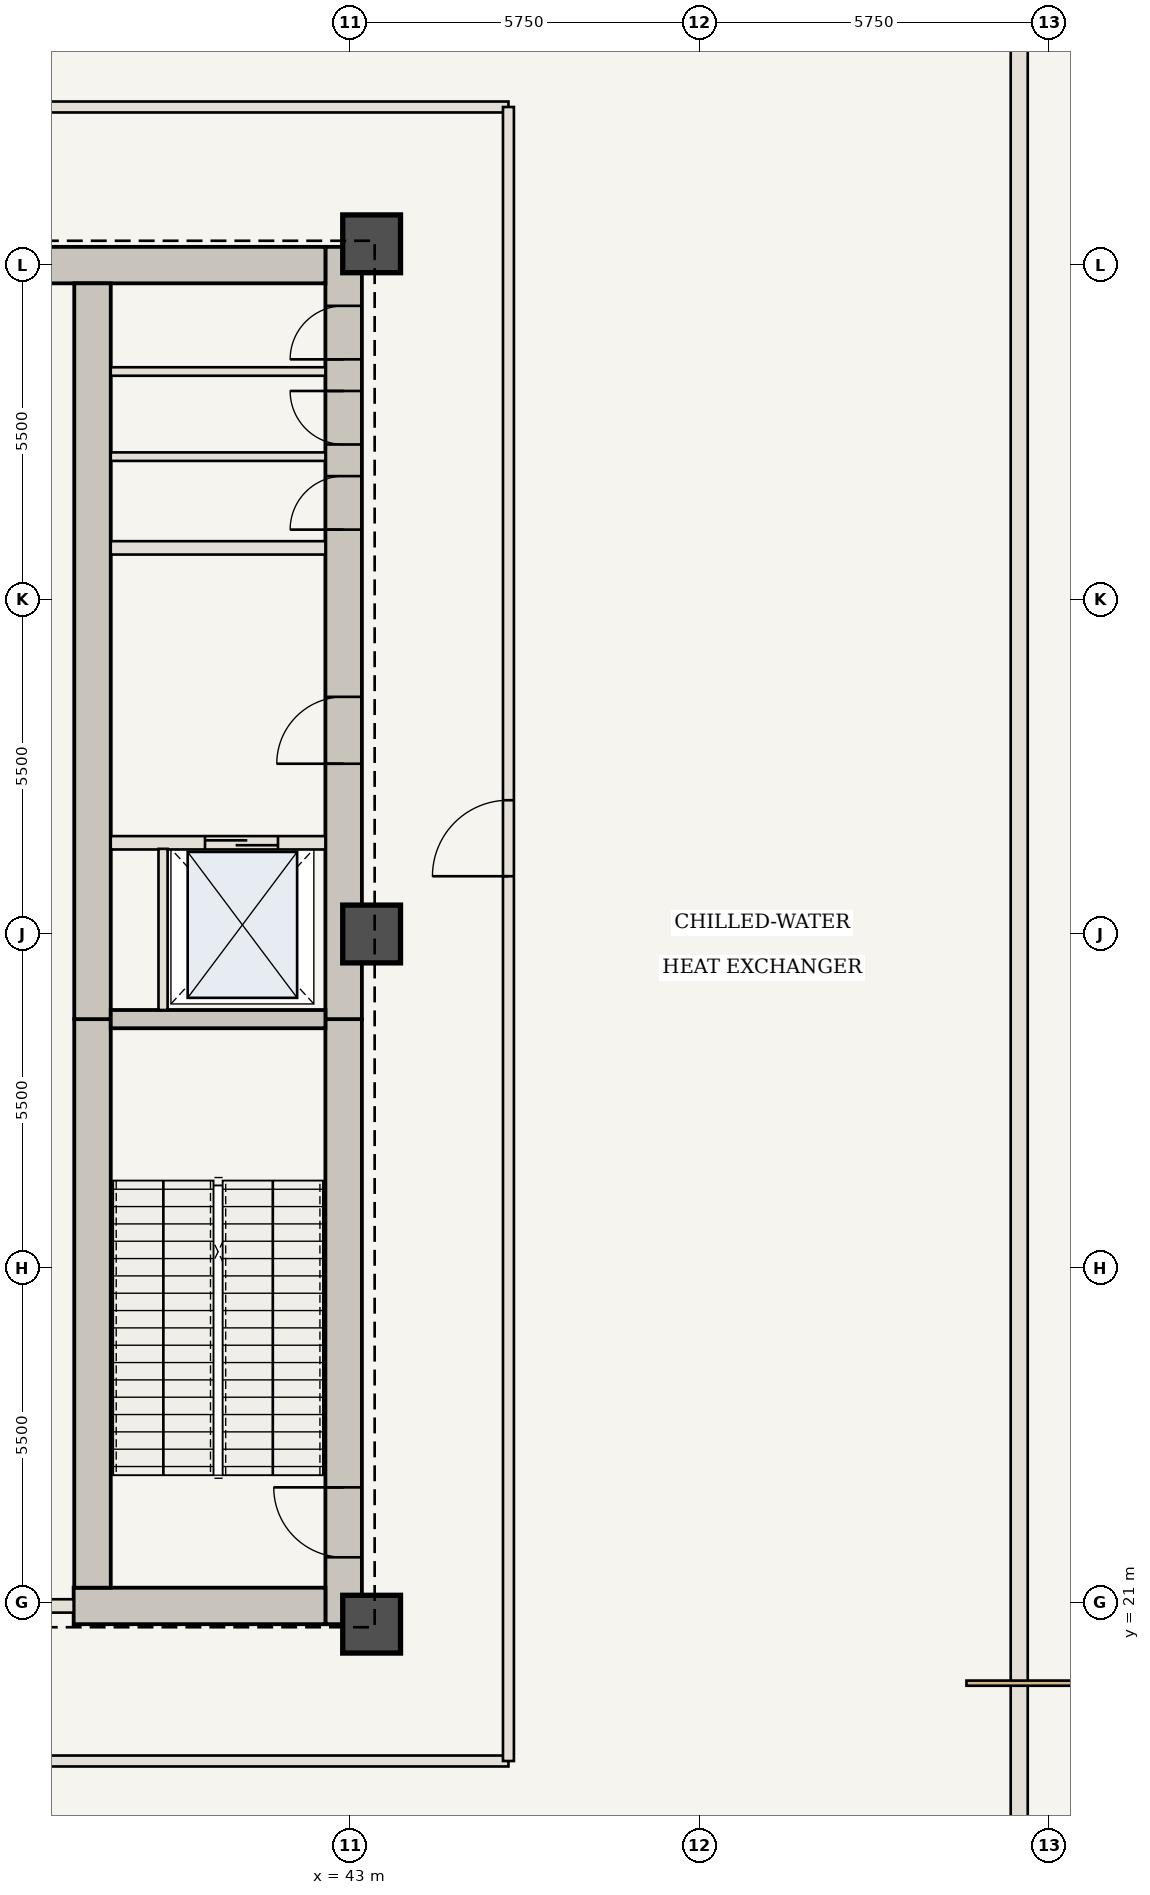
"""IFC4 building model, lengths in metres.
Left out: names, types, materials, properties, quantities, classifications, styles, units other than length and angle.
Written with IfcOpenShell. Run it as: python <this file> out.ifc"""

import sys

from ifc_helpers import new_model, si_unit, direction, frame, frame_2d, origin, origin_2d, place, context, subcontext, project, spatial, rectangle, extrude, element, fill, save


model = new_model("IFC4")
c1 = context("Model", 3, precision=1e-05, world=origin(), true_north=direction((0.0, 1.0)))
c2 = subcontext(c1, "Body", "Model", "MODEL_VIEW")
j1 = project(units=[si_unit("LENGTHUNIT", "METRE"), si_unit("PLANEANGLEUNIT", "RADIAN")], contexts=[c1])
p1 = place(None, origin())
s1 = spatial("IfcSite", under=j1, at=p1, CompositionType="ELEMENT")
p2 = place(p1, origin())
s2 = spatial("IfcBuilding", under=s1, at=p2, CompositionType="ELEMENT")
p3 = place(p2, frame((0.0, 0.0, 176.05)))
s3 = spatial("IfcBuildingStorey", under=s2, at=p3, CompositionType="ELEMENT", Elevation=176.05)
p4 = place(p3, frame((42.89, 20.65, 0.0), z_axis=(0.0, 0.0, 1.0), x_axis=(0.0, 1.0, 0.0)))
e1 = element("IfcWall", 1, at=p4, inside=s3, PredefinedType="SHEAR", context=c2, shape_type="SweptSolid", body=[
    extrude(rectangle(XDim=9.95, YDim=0.6, at=frame_2d((4.975, 0.0))), origin(), (0.0, 0.0, 1.0), 6.3),
])
p5 = place(p4, frame((1.1, 0.0, 0.0)))
e2 = element("IfcOpeningElement", 2, at=p5, cuts=e1, PredefinedType="OPENING", context=c2, shape_type="SweptSolid", body=[
    extrude(rectangle(XDim=1.15, YDim=2.15, at=frame_2d((0.575, 1.075))), frame((0.0, 0.31, 0.0), z_axis=(0.0, -1.0, 0.0), x_axis=(1.0, 0.0, 0.0)), (0.0, 0.0, 1.0), 0.62),
])
p6 = place(p3, frame((42.89, 30.6, 0.0), z_axis=(0.0, 0.0, 1.0), x_axis=(0.0, 1.0, 0.0)))
e3 = element("IfcWall", 3, at=p6, inside=s3, PredefinedType="SHEAR", context=c2, shape_type="SweptSolid", body=[
    extrude(rectangle(XDim=12.7, YDim=0.6, at=frame_2d((6.35, 0.0))), origin(), (0.0, 0.0, 1.0), 6.3),
])
p7 = place(p6, frame((4.2, 0.0, 0.0)))
e4 = element("IfcOpeningElement", 4, at=p7, cuts=e3, PredefinedType="OPENING", context=c2, shape_type="SweptSolid", body=[
    extrude(rectangle(XDim=1.1, YDim=2.15, at=frame_2d((0.55, 1.075))), frame((0.0, 0.31, 0.0), z_axis=(0.0, -1.0, 0.0), x_axis=(1.0, 0.0, 0.0)), (0.0, 0.0, 1.0), 0.62),
])
p8 = place(p6, frame((8.05, 0.0, 0.0)))
e5 = element("IfcOpeningElement", 5, at=p8, cuts=e3, PredefinedType="OPENING", context=c2, shape_type="SweptSolid", body=[
    extrude(rectangle(XDim=0.88, YDim=2.1, at=frame_2d((0.44, 1.05))), frame((0.0, 0.31, 0.0), z_axis=(0.0, -1.0, 0.0), x_axis=(1.0, 0.0, 0.0)), (0.0, 0.0, 1.0), 0.62),
])
p9 = place(p6, frame((9.45, 0.0, 0.0)))
e6 = element("IfcOpeningElement", 6, at=p9, cuts=e3, PredefinedType="OPENING", context=c2, shape_type="SweptSolid", body=[
    extrude(rectangle(XDim=0.88, YDim=2.1, at=frame_2d((0.44, 1.05))), frame((0.0, 0.31, 0.0), z_axis=(0.0, -1.0, 0.0), x_axis=(1.0, 0.0, 0.0)), (0.0, 0.0, 1.0), 0.62),
])
p10 = place(p6, frame((10.85, 0.0, 0.0)))
e7 = element("IfcOpeningElement", 7, at=p10, cuts=e3, PredefinedType="OPENING", context=c2, shape_type="SweptSolid", body=[
    extrude(rectangle(XDim=0.88, YDim=2.1, at=frame_2d((0.44, 1.05))), frame((0.0, 0.31, 0.0), z_axis=(0.0, -1.0, 0.0), x_axis=(1.0, 0.0, 0.0)), (0.0, 0.0, 1.0), 0.62),
])
p11 = place(p3, frame((38.45, 20.95, 0.0), z_axis=(0.0, 0.0, 1.0), x_axis=(1.0, 0.0, 0.0)))
e8 = element("IfcWall", 8, at=p11, inside=s3, PredefinedType="SHEAR", context=c2, shape_type="SweptSolid", body=[
    extrude(rectangle(XDim=4.14, YDim=0.6, at=frame_2d((2.07, 0.0))), origin(), (0.0, 0.0, 1.0), 6.3),
])
p12 = place(p3, frame((37.75, 43.0, 0.0), z_axis=(0.0, 0.0, 1.0), x_axis=(1.0, 0.0, 0.0)))
e9 = element("IfcWall", 9, at=p12, inside=s3, PredefinedType="SHEAR", context=c2, shape_type="SweptSolid", body=[
    extrude(rectangle(XDim=4.84, YDim=0.6, at=frame_2d((2.42, 0.0))), origin(), (0.0, 0.0, 1.0), 6.3),
])
p13 = place(p3, frame((38.76, 21.25, 0.0), z_axis=(0.0, 0.0, 1.0), x_axis=(0.0, 1.0, 0.0)))
e10 = element("IfcWall", 10, at=p13, inside=s3, PredefinedType="SHEAR", context=c2, shape_type="SweptSolid", body=[
    extrude(rectangle(XDim=9.35, YDim=0.6, at=frame_2d((4.675, 0.0))), origin(), (0.0, 0.0, 1.0), 6.3),
])
p14 = place(p3, frame((38.76, 30.6, 0.0), z_axis=(0.0, 0.0, 1.0), x_axis=(0.0, 1.0, 0.0)))
e11 = element("IfcWall", 11, at=p14, inside=s3, PredefinedType="SHEAR", context=c2, shape_type="SweptSolid", body=[
    extrude(rectangle(XDim=12.1, YDim=0.6, at=frame_2d((6.05, 0.0))), origin(), (0.0, 0.0, 1.0), 6.3),
])
for number, where, z_axis, x_axis in (
    (12, (43.35, 20.65, 0.0), (0.0, 0.0, 1.0), (1.0, 0.0, 0.0)),
    (13, (43.35, 32.0, 0.0), (0.0, 0.0, 1.0), (1.0, 0.0, 0.0)),
    (14, (43.35, 43.35, 0.0), (0.0, 0.0, 1.0), (1.0, 0.0, 0.0)),
):
    element("IfcColumn", number, at=place(p3, frame(where, z_axis=z_axis, x_axis=x_axis)), inside=s3, PredefinedType="COLUMN", context=c2, shape_type="SweptSolid", body=[
        extrude(rectangle(XDim=0.95, YDim=0.95, at=origin_2d()), origin(), (0.0, 0.0, 1.0), 5.88),
    ])
p15 = place(p3, frame((39.06, 30.6, 0.0), z_axis=(0.0, 0.0, 1.0), x_axis=(1.0, 0.0, 0.0)))
e15 = element("IfcWall", 15, at=p15, inside=s3, PredefinedType="SHEAR", context=c2, shape_type="SweptSolid", body=[
    extrude(rectangle(XDim=3.53, YDim=0.3, at=frame_2d((1.765, 0.0))), origin(), (0.0, 0.0, 1.0), 5.88),
])
p16 = place(p3, frame((39.06, 33.5, 0.0), z_axis=(0.0, 0.0, 1.0), x_axis=(1.0, 0.0, 0.0)))
e16 = element("IfcWall", 16, at=p16, inside=s3, PredefinedType="STANDARD", context=c2, shape_type="SweptSolid", body=[
    extrude(rectangle(XDim=3.53, YDim=0.22, at=frame_2d((1.765, 0.0))), origin(), (0.0, 0.0, 1.0), 5.88),
])
p17 = place(p16, frame((1.55, 0.0, 0.0)))
e17 = element("IfcOpeningElement", 17, at=p17, cuts=e16, PredefinedType="OPENING", context=c2, shape_type="SweptSolid", body=[
    extrude(rectangle(XDim=1.2, YDim=2.2, at=frame_2d((0.6, 1.1))), frame((0.0, 0.12, 0.0), z_axis=(0.0, -1.0, 0.0), x_axis=(1.0, 0.0, 0.0)), (0.0, 0.0, 1.0), 0.24),
])
p18 = place(p3, frame((39.92, 30.75, 0.0), z_axis=(0.0, 0.0, 1.0), x_axis=(0.0, 1.0, 0.0)))
e18 = element("IfcWall", 18, at=p18, inside=s3, PredefinedType="STANDARD", context=c2, shape_type="SweptSolid", body=[
    extrude(rectangle(XDim=2.65, YDim=0.15, at=frame_2d((1.325, 0.0))), origin(), (0.0, 0.0, 1.0), 5.88),
])
p19 = place(p3, frame((39.06, 38.35, 0.0), z_axis=(0.0, 0.0, 1.0), x_axis=(1.0, 0.0, 0.0)))
e19 = element("IfcWall", 19, at=p19, inside=s3, PredefinedType="STANDARD", context=c2, shape_type="SweptSolid", body=[
    extrude(rectangle(XDim=3.53, YDim=0.22, at=frame_2d((1.765, 0.0))), origin(), (0.0, 0.0, 1.0), 5.88),
])
for number, where, z_axis, x_axis in (
    (20, (39.06, 39.85, 0.0), (0.0, 0.0, 1.0), (1.0, 0.0, 0.0)),
    (21, (39.06, 41.25, 0.0), (0.0, 0.0, 1.0), (1.0, 0.0, 0.0)),
):
    element("IfcWall", number, at=place(p3, frame(where, z_axis=z_axis, x_axis=x_axis)), inside=s3, PredefinedType="STANDARD", context=c2, shape_type="SweptSolid", body=[
        extrude(rectangle(XDim=3.53, YDim=0.14, at=frame_2d((1.765, 0.0))), origin(), (0.0, 0.0, 1.0), 5.88),
    ])
p20 = place(p3, frame((35.15, 20.95, 0.0), z_axis=(0.0, 0.0, 1.0), x_axis=(1.0, 0.0, 0.0)))
e22 = element("IfcWall", 22, at=p20, inside=s3, PredefinedType="STANDARD", context=c2, shape_type="SweptSolid", body=[
    extrude(rectangle(XDim=3.3, YDim=0.22, at=frame_2d((1.65, 0.0))), origin(), (0.0, 0.0, 1.0), 5.88),
])
p21 = place(p20, frame((1.1, 0.0, 0.0)))
e23 = element("IfcOpeningElement", 23, at=p21, cuts=e22, PredefinedType="OPENING", context=c2, shape_type="SweptSolid", body=[
    extrude(rectangle(XDim=1.1, YDim=2.15, at=frame_2d((0.55, 1.075))), frame((0.0, 0.12, 0.0), z_axis=(0.0, -1.0, 0.0), x_axis=(1.0, 0.0, 0.0)), (0.0, 0.0, 1.0), 0.24),
])
p22 = place(p3, frame((18.4, 18.4, 0.0), z_axis=(0.0, 0.0, 1.0), x_axis=(1.0, 0.0, 0.0)))
e24 = element("IfcWall", 24, at=p22, inside=s3, PredefinedType="STANDARD", context=c2, shape_type="SweptSolid", body=[
    extrude(rectangle(XDim=27.2, YDim=0.18, at=frame_2d((13.6, 0.0))), origin(), (0.0, 0.0, 1.0), 5.88),
])
p23 = place(p22, frame((4.4, 0.0, 0.0)))
e25 = element("IfcOpeningElement", 25, at=p23, cuts=e24, PredefinedType="OPENING", context=c2, shape_type="SweptSolid", body=[
    extrude(rectangle(XDim=1.25, YDim=2.2, at=frame_2d((0.625, 1.1))), frame((0.0, 0.1, 0.0), z_axis=(0.0, -1.0, 0.0), x_axis=(1.0, 0.0, 0.0)), (0.0, 0.0, 1.0), 0.2),
])
p24 = place(p3, frame((18.4, 45.6, 0.0), z_axis=(0.0, 0.0, 1.0), x_axis=(1.0, 0.0, 0.0)))
e26 = element("IfcWall", 26, at=p24, inside=s3, PredefinedType="STANDARD", context=c2, shape_type="SweptSolid", body=[
    extrude(rectangle(XDim=27.2, YDim=0.18, at=frame_2d((13.6, 0.0))), origin(), (0.0, 0.0, 1.0), 5.88),
])
p25 = place(p24, frame((4.4, 0.0, 0.0)))
e27 = element("IfcOpeningElement", 27, at=p25, cuts=e26, PredefinedType="OPENING", context=c2, shape_type="SweptSolid", body=[
    extrude(rectangle(XDim=1.25, YDim=2.2, at=frame_2d((0.625, 1.1))), frame((0.0, 0.1, 0.0), z_axis=(0.0, -1.0, 0.0), x_axis=(1.0, 0.0, 0.0)), (0.0, 0.0, 1.0), 0.2),
])
p26 = place(p3, frame((45.6, 18.4, 0.0), z_axis=(0.0, 0.0, 1.0), x_axis=(0.0, 1.0, 0.0)))
e28 = element("IfcWall", 28, at=p26, inside=s3, PredefinedType="STANDARD", context=c2, shape_type="SweptSolid", body=[
    extrude(rectangle(XDim=27.2, YDim=0.18, at=frame_2d((13.6, 0.0))), origin(), (0.0, 0.0, 1.0), 5.88),
])
p27 = place(p26, frame((14.55, 0.0, 0.0)))
e29 = element("IfcOpeningElement", 29, at=p27, cuts=e28, PredefinedType="OPENING", context=c2, shape_type="SweptSolid", body=[
    extrude(rectangle(XDim=1.25, YDim=2.2, at=frame_2d((0.625, 1.1))), frame((0.0, 0.1, 0.0), z_axis=(0.0, -1.0, 0.0), x_axis=(1.0, 0.0, 0.0)), (0.0, 0.0, 1.0), 0.2),
])
p28 = place(p3, frame((54.0, 54.0, 0.0), z_axis=(0.0, 0.0, 1.0), x_axis=(0.0, -1.0, 0.0)))
e30 = element("IfcWall", 30, at=p28, inside=s3, PredefinedType="USERDEFINED", context=c2, shape_type="SweptSolid", body=[
    extrude(rectangle(XDim=44.0, YDim=0.28, at=frame_2d((22.0, 0.0))), origin(), (0.0, 0.0, 1.0), 3.88),
])
p29 = place(p5, origin())
e31 = element("IfcDoor", 31, at=p29, inside=s3, OperationType="SINGLE_SWING_RIGHT", PredefinedType="DOOR", context=c2, shape_type="SweptSolid", body=[
    extrude(rectangle(XDim=1.15, YDim=2.15, at=frame_2d((0.575, 1.075))), frame((0.0, 0.025, 0.0), z_axis=(0.0, -1.0, 0.0), x_axis=(1.0, 0.0, 0.0)), (0.0, 0.0, 1.0), 0.05),
])
fill(e2, e31)
p30 = place(p7, origin())
e32 = element("IfcDoor", 32, at=p30, inside=s3, OperationType="SINGLE_SWING_LEFT", PredefinedType="DOOR", context=c2, shape_type="SweptSolid", body=[
    extrude(rectangle(XDim=1.1, YDim=2.15, at=frame_2d((0.55, 1.075))), frame((0.0, 0.025, 0.0), z_axis=(0.0, -1.0, 0.0), x_axis=(1.0, 0.0, 0.0)), (0.0, 0.0, 1.0), 0.05),
])
fill(e4, e32)
p31 = place(p8, origin())
e33 = element("IfcDoor", 33, at=p31, inside=s3, OperationType="SINGLE_SWING_LEFT", PredefinedType="DOOR", context=c2, shape_type="SweptSolid", body=[
    extrude(rectangle(XDim=0.88, YDim=2.1, at=frame_2d((0.44, 1.05))), frame((0.0, 0.025, 0.0), z_axis=(0.0, -1.0, 0.0), x_axis=(1.0, 0.0, 0.0)), (0.0, 0.0, 1.0), 0.05),
])
fill(e5, e33)
p32 = place(p9, origin())
e34 = element("IfcDoor", 34, at=p32, inside=s3, OperationType="SINGLE_SWING_RIGHT", PredefinedType="DOOR", context=c2, shape_type="SweptSolid", body=[
    extrude(rectangle(XDim=0.88, YDim=2.1, at=frame_2d((0.44, 1.05))), frame((0.0, 0.025, 0.0), z_axis=(0.0, -1.0, 0.0), x_axis=(1.0, 0.0, 0.0)), (0.0, 0.0, 1.0), 0.05),
])
fill(e6, e34)
p33 = place(p10, origin())
e35 = element("IfcDoor", 35, at=p33, inside=s3, OperationType="SINGLE_SWING_LEFT", PredefinedType="DOOR", context=c2, shape_type="SweptSolid", body=[
    extrude(rectangle(XDim=0.88, YDim=2.1, at=frame_2d((0.44, 1.05))), frame((0.0, 0.025, 0.0), z_axis=(0.0, -1.0, 0.0), x_axis=(1.0, 0.0, 0.0)), (0.0, 0.0, 1.0), 0.05),
])
fill(e7, e35)
p34 = place(p17, origin())
e36 = element("IfcDoor", 36, at=p34, inside=s3, OperationType="DOUBLE_DOOR_SLIDING", PredefinedType="DOOR", context=c2, shape_type="SweptSolid", body=[
    extrude(rectangle(XDim=1.2, YDim=2.2, at=frame_2d((0.6, 1.1))), frame((0.0, 0.025, 0.0), z_axis=(0.0, -1.0, 0.0), x_axis=(1.0, 0.0, 0.0)), (0.0, 0.0, 1.0), 0.05),
])
fill(e17, e36)
p35 = place(p27, origin())
e37 = element("IfcDoor", 37, at=p35, inside=s3, OperationType="SINGLE_SWING_LEFT", PredefinedType="DOOR", context=c2, shape_type="SweptSolid", body=[
    extrude(rectangle(XDim=1.25, YDim=2.2, at=frame_2d((0.625, 1.1))), frame((0.0, 0.025, 0.0), z_axis=(0.0, -1.0, 0.0), x_axis=(1.0, 0.0, 0.0)), (0.0, 0.0, 1.0), 0.05),
])
fill(e29, e37)
save(model, sys.argv[1])
